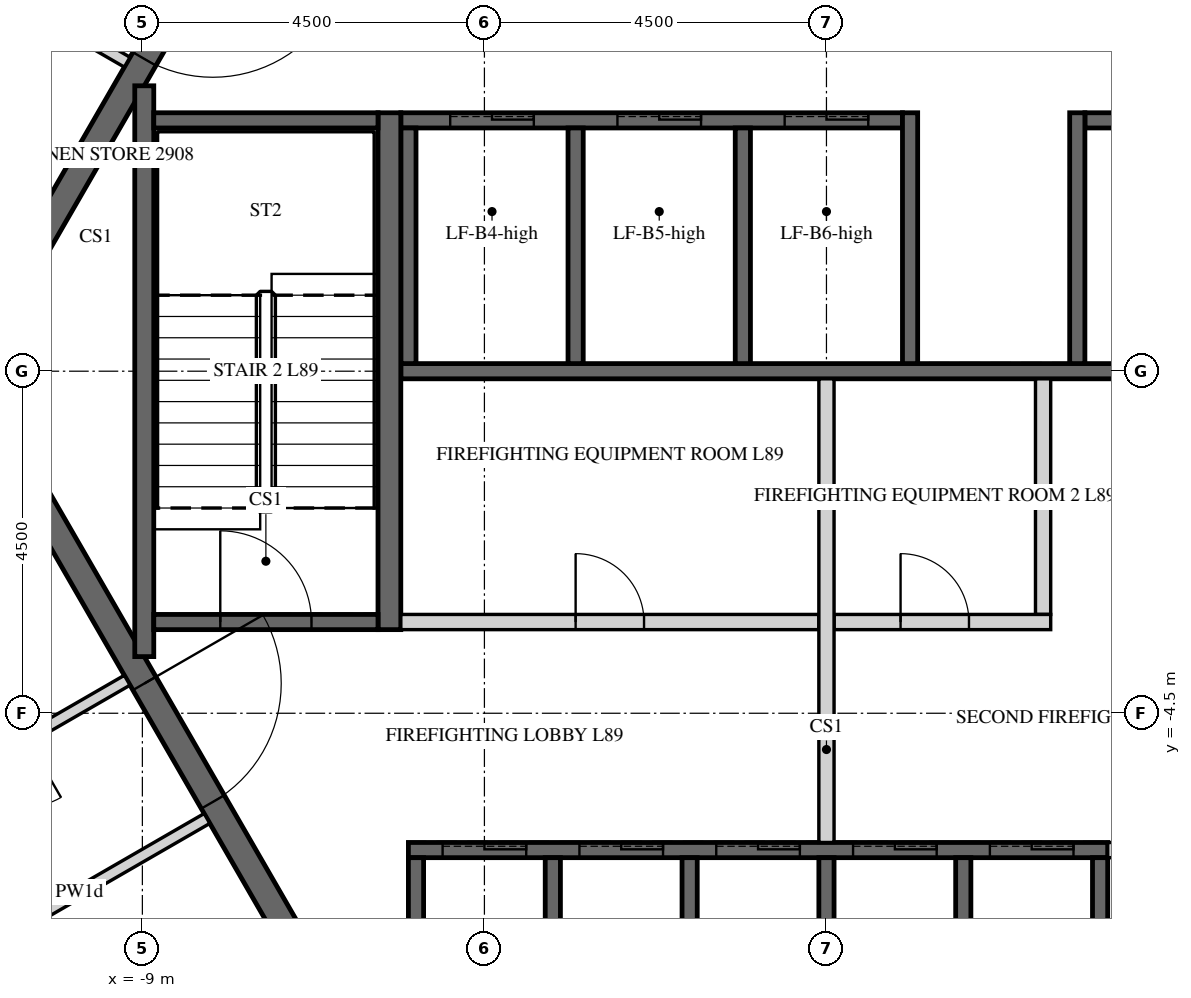
"""IFC4 building model, lengths in metres.
Left out: names, types, materials, properties, quantities, classifications, styles, units other than length and angle.
Written with IfcOpenShell. Run it as: python <this file> out.ifc"""

import sys

from ifc_helpers import new_model, si_unit, direction, frame, frame_2d, origin, place, context, subcontext, project, spatial, polyline, rectangle, outline, extrude, element, fill, save


model = new_model("IFC4")
c1 = context("Model", 3, precision=1e-05, world=origin(), true_north=direction((0.0, 1.0)))
c2 = subcontext(c1, "Body", "Model", "MODEL_VIEW")
j1 = project(units=[si_unit("LENGTHUNIT", "METRE"), si_unit("PLANEANGLEUNIT", "RADIAN")], contexts=[c1])
p1 = place(None, origin())
s1 = spatial("IfcSite", under=j1, at=p1, CompositionType="ELEMENT")
p2 = place(p1, origin())
s2 = spatial("IfcBuilding", under=s1, at=p2, CompositionType="ELEMENT")
p3 = place(p2, frame((0.0, 0.0, 369.0)))
s3 = spatial("IfcBuildingStorey", under=s2, at=p3, CompositionType="ELEMENT", Elevation=369.0)
p4 = place(p3, frame((-5.673, 9.825, -0.15), z_axis=(0.0, 0.0, 1.0), x_axis=(-0.499995046907, -0.866028263435, 0.0)))
e1 = element("IfcWall", 1, at=p4, inside=s3, PredefinedType="SHEAR", context=c2, shape_type="SweptSolid", body=[
    extrude(outline(polyline([(-0.101, -0.175), (11.446, -0.175), (11.244, 0.175), (0.101, 0.175), (-0.101, -0.175)])), origin(), (0.0, 0.0, 1.0), 3.9),
])
p5 = place(p4, frame((4.801, 0.0, 0.15)))
e2 = element("IfcOpeningElement", 2, at=p5, cuts=e1, PredefinedType="OPENING", context=c2, shape_type="SweptSolid", body=[
    extrude(rectangle(XDim=1.8, YDim=2.4, at=frame_2d((0.9, 1.2))), frame((0.0, 0.185, 0.0), z_axis=(0.0, -1.0, 0.0), x_axis=(1.0, 0.0, 0.0)), (0.0, 0.0, 1.0), 0.37),
])
p6 = place(p3, frame((-11.345, 0.0, -0.15), z_axis=(0.0, 0.0, 1.0), x_axis=(0.499995046907, -0.866028263435, 0.0)))
e3 = element("IfcWall", 3, at=p6, inside=s3, PredefinedType="SHEAR", context=c2, shape_type="SweptSolid", body=[
    extrude(outline(polyline([(-0.101, -0.175), (11.446, -0.175), (11.244, 0.175), (0.101, 0.175), (-0.101, -0.175)])), origin(), (0.0, 0.0, 1.0), 3.9),
])
p7 = place(p6, frame((4.744, 0.0, 0.15)))
e4 = element("IfcOpeningElement", 4, at=p7, cuts=e3, PredefinedType="OPENING", context=c2, shape_type="SweptSolid", body=[
    extrude(rectangle(XDim=1.8, YDim=2.4, at=frame_2d((0.9, 1.2))), frame((0.0, 0.185, 0.0), z_axis=(0.0, -1.0, 0.0), x_axis=(1.0, 0.0, 0.0)), (0.0, 0.0, 1.0), 0.37),
])
p8 = place(p3, frame((-5.6, 3.3, -0.25), z_axis=(0.0, 0.0, 1.0), x_axis=(1.0, 0.0, 0.0)))
e5 = element("IfcWall", 5, at=p8, inside=s3, PredefinedType="SHEAR", context=c2, shape_type="SweptSolid", body=[
    extrude(rectangle(XDim=6.6, YDim=0.2, at=frame_2d((3.3, 0.0))), origin(), (0.0, 0.0, 1.0), 3.9),
])
p9 = place(p8, frame((0.65, 0.0, 0.25)))
e6 = element("IfcOpeningElement", 6, at=p9, cuts=e5, PredefinedType="OPENING", context=c2, shape_type="SweptSolid", body=[
    extrude(rectangle(XDim=1.1, YDim=2.1, at=frame_2d((0.55, 1.05))), frame((0.0, 0.11, 0.0), z_axis=(0.0, -1.0, 0.0), x_axis=(1.0, 0.0, 0.0)), (0.0, 0.0, 1.0), 0.22),
])
p10 = place(p8, frame((2.85, 0.0, 0.25)))
e7 = element("IfcOpeningElement", 7, at=p10, cuts=e5, PredefinedType="OPENING", context=c2, shape_type="SweptSolid", body=[
    extrude(rectangle(XDim=1.1, YDim=2.1, at=frame_2d((0.55, 1.05))), frame((0.0, 0.11, 0.0), z_axis=(0.0, -1.0, 0.0), x_axis=(1.0, 0.0, 0.0)), (0.0, 0.0, 1.0), 0.22),
])
p11 = place(p8, frame((5.05, 0.0, 0.25)))
e8 = element("IfcOpeningElement", 8, at=p11, cuts=e5, PredefinedType="OPENING", context=c2, shape_type="SweptSolid", body=[
    extrude(rectangle(XDim=1.1, YDim=2.1, at=frame_2d((0.55, 1.05))), frame((0.0, 0.11, 0.0), z_axis=(0.0, -1.0, 0.0), x_axis=(1.0, 0.0, 0.0)), (0.0, 0.0, 1.0), 0.22),
])
p12 = place(p3, frame((3.4, 3.3, -0.25), z_axis=(0.0, 0.0, 1.0), x_axis=(1.0, 0.0, 0.0)))
e9 = element("IfcWall", 9, at=p12, inside=s3, PredefinedType="SHEAR", context=c2, shape_type="SweptSolid", body=[
    extrude(rectangle(XDim=2.2, YDim=0.2, at=frame_2d((1.1, 0.0))), origin(), (0.0, 0.0, 1.0), 3.9),
])
p13 = place(p12, frame((0.45, 0.0, 0.25)))
e10 = element("IfcOpeningElement", 10, at=p13, cuts=e9, PredefinedType="OPENING", context=c2, shape_type="SweptSolid", body=[
    extrude(rectangle(XDim=1.1, YDim=2.1, at=frame_2d((0.55, 1.05))), frame((0.0, 0.11, 0.0), z_axis=(0.0, -1.0, 0.0), x_axis=(1.0, 0.0, 0.0)), (0.0, 0.0, 1.0), 0.22),
])
p14 = place(p3, frame((-5.6, 0.0, -0.25), z_axis=(0.0, 0.0, 1.0), x_axis=(1.0, 0.0, 0.0)))
e11 = element("IfcWall", 11, at=p14, inside=s3, PredefinedType="SHEAR", context=c2, shape_type="SweptSolid", body=[
    extrude(rectangle(XDim=11.2, YDim=0.2, at=frame_2d((5.6, 0.0))), origin(), (0.0, 0.0, 1.0), 3.9),
])
for number, where, z_axis, x_axis in (
    (12, (-5.5, 0.1, -0.25), (0.0, 0.0, 1.0), (0.0, 1.0, 0.0)),
    (13, (-3.3, 0.1, -0.25), (0.0, 0.0, 1.0), (0.0, 1.0, 0.0)),
    (14, (-1.1, 0.1, -0.25), (0.0, 0.0, 1.0), (0.0, 1.0, 0.0)),
):
    element("IfcWall", number, at=place(p3, frame(where, z_axis=z_axis, x_axis=x_axis)), inside=s3, PredefinedType="SHEAR", context=c2, shape_type="SweptSolid", body=[
        extrude(rectangle(XDim=3.1, YDim=0.2, at=frame_2d((1.55, 0.0))), origin(), (0.0, 0.0, 1.0), 3.9),
    ])
for number, where, z_axis, x_axis in (
    (15, (1.1, 0.1, -0.25), (0.0, 0.0, 1.0), (0.0, 1.0, 0.0)),
    (16, (3.3, 0.1, -0.25), (0.0, 0.0, 1.0), (0.0, 1.0, 0.0)),
):
    element("IfcWall", number, at=place(p3, frame(where, z_axis=z_axis, x_axis=x_axis)), inside=s3, PredefinedType="SHEAR", context=c2, shape_type="SweptSolid", body=[
        extrude(rectangle(XDim=3.3, YDim=0.2, at=frame_2d((1.65, 0.0))), origin(), (0.0, 0.0, 1.0), 3.9),
    ])
p15 = place(p3, frame((-5.5, -6.3, -0.25), z_axis=(0.0, 0.0, 1.0), x_axis=(1.0, 0.0, 0.0)))
e17 = element("IfcWall", 17, at=p15, inside=s3, PredefinedType="SHEAR", context=c2, shape_type="SweptSolid", body=[
    extrude(rectangle(XDim=9.2, YDim=0.2, at=frame_2d((4.6, 0.0))), origin(), (0.0, 0.0, 1.0), 3.9),
])
p16 = place(p15, frame((0.45, 0.0, 0.25)))
e18 = element("IfcOpeningElement", 18, at=p16, cuts=e17, PredefinedType="OPENING", context=c2, shape_type="SweptSolid", body=[
    extrude(rectangle(XDim=1.1, YDim=2.1, at=frame_2d((0.55, 1.05))), frame((0.0, 0.11, 0.0), z_axis=(0.0, -1.0, 0.0), x_axis=(1.0, 0.0, 0.0)), (0.0, 0.0, 1.0), 0.22),
])
p17 = place(p15, frame((2.25, 0.0, 0.25)))
e19 = element("IfcOpeningElement", 19, at=p17, cuts=e17, PredefinedType="OPENING", context=c2, shape_type="SweptSolid", body=[
    extrude(rectangle(XDim=1.1, YDim=2.1, at=frame_2d((0.55, 1.05))), frame((0.0, 0.11, 0.0), z_axis=(0.0, -1.0, 0.0), x_axis=(1.0, 0.0, 0.0)), (0.0, 0.0, 1.0), 0.22),
])
p18 = place(p15, frame((4.05, 0.0, 0.25)))
e20 = element("IfcOpeningElement", 20, at=p18, cuts=e17, PredefinedType="OPENING", context=c2, shape_type="SweptSolid", body=[
    extrude(rectangle(XDim=1.1, YDim=2.1, at=frame_2d((0.55, 1.05))), frame((0.0, 0.11, 0.0), z_axis=(0.0, -1.0, 0.0), x_axis=(1.0, 0.0, 0.0)), (0.0, 0.0, 1.0), 0.22),
])
p19 = place(p15, frame((5.85, 0.0, 0.25)))
e21 = element("IfcOpeningElement", 21, at=p19, cuts=e17, PredefinedType="OPENING", context=c2, shape_type="SweptSolid", body=[
    extrude(rectangle(XDim=1.1, YDim=2.1, at=frame_2d((0.55, 1.05))), frame((0.0, 0.11, 0.0), z_axis=(0.0, -1.0, 0.0), x_axis=(1.0, 0.0, 0.0)), (0.0, 0.0, 1.0), 0.22),
])
p20 = place(p15, frame((7.65, 0.0, 0.25)))
e22 = element("IfcOpeningElement", 22, at=p20, cuts=e17, PredefinedType="OPENING", context=c2, shape_type="SweptSolid", body=[
    extrude(rectangle(XDim=1.1, YDim=2.1, at=frame_2d((0.55, 1.05))), frame((0.0, 0.11, 0.0), z_axis=(0.0, -1.0, 0.0), x_axis=(1.0, 0.0, 0.0)), (0.0, 0.0, 1.0), 0.22),
])
for number, where, z_axis, x_axis in (
    (23, (-5.4, -9.3, -0.25), (0.0, 0.0, 1.0), (0.0, 1.0, 0.0)),
    (24, (-3.6, -9.3, -0.25), (0.0, 0.0, 1.0), (0.0, 1.0, 0.0)),
    (25, (-1.8, -9.3, -0.25), (0.0, 0.0, 1.0), (0.0, 1.0, 0.0)),
    (26, (0.0, -9.3, -0.25), (0.0, 0.0, 1.0), (0.0, 1.0, 0.0)),
    (27, (1.8, -9.3, -0.25), (0.0, 0.0, 1.0), (0.0, 1.0, 0.0)),
    (28, (3.6, -9.3, -0.25), (0.0, 0.0, 1.0), (0.0, 1.0, 0.0)),
):
    element("IfcWall", number, at=place(p3, frame(where, z_axis=z_axis, x_axis=x_axis)), inside=s3, PredefinedType="SHEAR", context=c2, shape_type="SweptSolid", body=[
        extrude(rectangle(XDim=2.9, YDim=0.2, at=frame_2d((1.45, 0.0))), origin(), (0.0, 0.0, 1.0), 3.9),
    ])
p21 = place(p3, frame((-5.6, -3.3, 0.0), z_axis=(0.0, 0.0, 1.0), x_axis=(1.0, 0.0, 0.0)))
e29 = element("IfcWall", 29, at=p21, inside=s3, PredefinedType="PARTITIONING", context=c2, shape_type="SweptSolid", body=[
    extrude(rectangle(XDim=5.5, YDim=0.2, at=frame_2d((2.75, 0.0))), origin(), (0.0, 0.0, 1.0), 3.65),
])
p22 = place(p21, frame((2.3, 0.0, 0.0)))
e30 = element("IfcOpeningElement", 30, at=p22, cuts=e29, PredefinedType="OPENING", context=c2, shape_type="SweptSolid", body=[
    extrude(rectangle(XDim=0.9, YDim=2.1, at=frame_2d((0.45, 1.05))), frame((0.0, 0.11, 0.0), z_axis=(0.0, -1.0, 0.0), x_axis=(1.0, 0.0, 0.0)), (0.0, 0.0, 1.0), 0.22),
])
p23 = place(p3, frame((0.1, -3.3, 0.0), z_axis=(0.0, 0.0, 1.0), x_axis=(1.0, 0.0, 0.0)))
e31 = element("IfcWall", 31, at=p23, inside=s3, PredefinedType="PARTITIONING", context=c2, shape_type="SweptSolid", body=[
    extrude(rectangle(XDim=2.85, YDim=0.2, at=frame_2d((1.425, 0.0))), origin(), (0.0, 0.0, 1.0), 3.65),
])
p24 = place(p23, frame((0.875, 0.0, 0.0)))
e32 = element("IfcOpeningElement", 32, at=p24, cuts=e31, PredefinedType="OPENING", context=c2, shape_type="SweptSolid", body=[
    extrude(rectangle(XDim=0.9, YDim=2.1, at=frame_2d((0.45, 1.05))), frame((0.0, 0.11, 0.0), z_axis=(0.0, -1.0, 0.0), x_axis=(1.0, 0.0, 0.0)), (0.0, 0.0, 1.0), 0.22),
])
p25 = place(p3, frame((2.85, -3.2, 0.0), z_axis=(0.0, 0.0, 1.0), x_axis=(0.0, 1.0, 0.0)))
e33 = element("IfcWall", 33, at=p25, inside=s3, PredefinedType="PARTITIONING", context=c2, shape_type="SweptSolid", body=[
    extrude(rectangle(XDim=3.1, YDim=0.2, at=frame_2d((1.55, 0.0))), origin(), (0.0, 0.0, 1.0), 3.65),
])
p26 = place(p3, frame((0.0, -6.2, 0.0), z_axis=(0.0, 0.0, 1.0), x_axis=(0.0, 1.0, 0.0)))
e34 = element("IfcWall", 34, at=p26, inside=s3, PredefinedType="PARTITIONING", context=c2, shape_type="SweptSolid", body=[
    extrude(rectangle(XDim=6.1, YDim=0.2, at=frame_2d((3.05, 0.0))), origin(), (0.0, 0.0, 1.0), 3.65),
])
p27 = place(p3, frame((3.7, -6.3, 0.0), z_axis=(0.0, 0.0, 1.0), x_axis=(1.0, 0.0, 0.0)))
e35 = element("IfcWall", 35, at=p27, inside=s3, PredefinedType="PARTITIONING", context=c2, shape_type="SweptSolid", body=[
    extrude(rectangle(XDim=3.806, YDim=0.2, at=frame_2d((1.903, 0.0))), origin(), (0.0, 0.0, 1.0), 3.65),
])
p28 = place(p27, frame((1.453, 0.0, 0.0)))
e36 = element("IfcOpeningElement", 36, at=p28, cuts=e35, PredefinedType="OPENING", context=c2, shape_type="SweptSolid", body=[
    extrude(rectangle(XDim=0.9, YDim=2.1, at=frame_2d((0.45, 1.05))), frame((0.0, 0.11, 0.0), z_axis=(0.0, -1.0, 0.0), x_axis=(1.0, 0.0, 0.0)), (0.0, 0.0, 1.0), 0.22),
])
p29 = place(p3, frame((-5.75, -3.4, -0.25), z_axis=(0.0, 0.0, 1.0), x_axis=(0.0, 1.0, 0.0)))
e37 = element("IfcWall", 37, at=p29, inside=s3, PredefinedType="SHEAR", context=c2, shape_type="SweptSolid", body=[
    extrude(rectangle(XDim=6.8, YDim=0.3, at=frame_2d((3.4, 0.0))), origin(), (0.0, 0.0, 1.0), 3.9),
])
p30 = place(p3, frame((-8.975, -3.755, -0.25), z_axis=(0.0, 0.0, 1.0), x_axis=(0.0, 1.0, 0.0)))
e38 = element("IfcWall", 38, at=p30, inside=s3, PredefinedType="SHEAR", context=c2, shape_type="SweptSolid", body=[
    extrude(rectangle(XDim=7.51, YDim=0.25, at=frame_2d((3.755, 0.0))), origin(), (0.0, 0.0, 1.0), 3.9),
])
p31 = place(p3, frame((-8.85, 3.3, -0.25), z_axis=(0.0, 0.0, 1.0), x_axis=(1.0, 0.0, 0.0)))
e39 = element("IfcWall", 39, at=p31, inside=s3, PredefinedType="SHEAR", context=c2, shape_type="SweptSolid", body=[
    extrude(rectangle(XDim=2.95, YDim=0.2, at=frame_2d((1.475, 0.0))), origin(), (0.0, 0.0, 1.0), 3.9),
])
p32 = place(p3, frame((-8.85, -3.3, -0.25), z_axis=(0.0, 0.0, 1.0), x_axis=(1.0, 0.0, 0.0)))
e40 = element("IfcWall", 40, at=p32, inside=s3, PredefinedType="SHEAR", context=c2, shape_type="SweptSolid", body=[
    extrude(rectangle(XDim=2.95, YDim=0.2, at=frame_2d((1.475, 0.0))), origin(), (0.0, 0.0, 1.0), 3.9),
])
p33 = place(p32, frame((0.875, 0.0, 0.25)))
e41 = element("IfcOpeningElement", 41, at=p33, cuts=e40, PredefinedType="OPENING", context=c2, shape_type="SweptSolid", body=[
    extrude(rectangle(XDim=1.2, YDim=2.4, at=frame_2d((0.6, 1.2))), frame((0.0, 0.11, 0.0), z_axis=(0.0, -1.0, 0.0), x_axis=(1.0, 0.0, 0.0)), (0.0, 0.0, 1.0), 0.22),
])
p34 = place(p3, frame((-7.653, 15.675, 0.0), z_axis=(0.0, 0.0, 1.0), x_axis=(-0.438369669055, -0.898794767037, 0.0)))
e42 = element("IfcWall", 42, at=p34, inside=s3, PredefinedType="PARTITIONING", context=c2, shape_type="SweptSolid", body=[
    extrude(rectangle(XDim=15.243, YDim=0.15, at=frame_2d((7.621, 0.0))), origin(), (0.0, 0.0, 1.0), 2.47),
])
p35 = place(p34, frame((2.942, 0.0, 0.0)))
e43 = element("IfcOpeningElement", 43, at=p35, cuts=e42, PredefinedType="OPENING", context=c2, shape_type="SweptSolid", body=[
    extrude(rectangle(XDim=1.0, YDim=2.1, at=frame_2d((0.5, 1.05))), frame((0.0, 0.085, 0.0), z_axis=(0.0, -1.0, 0.0), x_axis=(1.0, 0.0, 0.0)), (0.0, 0.0, 1.0), 0.17),
])
p36 = place(p3, frame((-10.783, 4.98, 0.0), z_axis=(0.0, 0.0, 1.0), x_axis=(0.866007702746, -0.500030657845, 0.0)))
e44 = element("IfcWall", 44, at=p36, inside=s3, PredefinedType="PARTITIONING", context=c2, shape_type="SweptSolid", body=[
    extrude(rectangle(XDim=1.829, YDim=0.15, at=frame_2d((0.914, 0.0))), origin(), (0.0, 0.0, 1.0), 2.47),
])
p37 = place(p3, frame((-16.583, -2.777, 0.0), z_axis=(0.0, 0.0, 1.0), x_axis=(0.50000467473, -0.866022704811, 0.0)))
e45 = element("IfcWall", 45, at=p37, inside=s3, PredefinedType="PARTITIONING", context=c2, shape_type="SweptSolid", body=[
    extrude(rectangle(XDim=13.504, YDim=0.15, at=frame_2d((6.752, 0.0))), origin(), (0.0, 0.0, 1.0), 2.47),
])
p38 = place(p37, frame((0.925, 0.0, 0.0)))
e46 = element("IfcOpeningElement", 46, at=p38, cuts=e45, PredefinedType="OPENING", context=c2, shape_type="SweptSolid", body=[
    extrude(rectangle(XDim=1.0, YDim=2.1, at=frame_2d((0.5, 1.05))), frame((0.0, 0.085, 0.0), z_axis=(0.0, -1.0, 0.0), x_axis=(1.0, 0.0, 0.0)), (0.0, 0.0, 1.0), 0.17),
])
p39 = place(p3, frame((-9.2, -4.066, 0.0), z_axis=(0.0, 0.0, 1.0), x_axis=(-0.866020906874, -0.500007788796, 0.0)))
e47 = element("IfcWall", 47, at=p39, inside=s3, PredefinedType="PARTITIONING", context=c2, shape_type="SweptSolid", body=[
    extrude(rectangle(XDim=3.95, YDim=0.15, at=frame_2d((1.975, 0.0))), origin(), (0.0, 0.0, 1.0), 2.47),
])
p40 = place(p39, frame((1.525, 0.0, 0.0)))
e48 = element("IfcOpeningElement", 48, at=p40, cuts=e47, PredefinedType="OPENING", context=c2, shape_type="SweptSolid", body=[
    extrude(rectangle(XDim=0.9, YDim=2.1, at=frame_2d((0.45, 1.05))), frame((0.0, 0.085, 0.0), z_axis=(0.0, -1.0, 0.0), x_axis=(1.0, 0.0, 0.0)), (0.0, 0.0, 1.0), 0.17),
])
p41 = place(p3, frame((-11.506, -7.822, 0.0), z_axis=(0.0, 0.0, 1.0), x_axis=(0.866032409438, 0.499987865656, 0.0)))
e49 = element("IfcWall", 49, at=p41, inside=s3, PredefinedType="PARTITIONING", context=c2, shape_type="SweptSolid", body=[
    extrude(rectangle(XDim=3.875, YDim=0.15, at=frame_2d((1.938, 0.0))), origin(), (0.0, 0.0, 1.0), 2.47),
])
p42 = place(p5, origin())
e50 = element("IfcDoor", 50, at=p42, inside=s3, OperationType="DOUBLE_DOOR_SINGLE_SWING", PredefinedType="DOOR", context=c2, shape_type="SweptSolid", body=[
    extrude(rectangle(XDim=1.8, YDim=2.4, at=frame_2d((0.9, 1.2))), frame((0.0, 0.025, 0.0), z_axis=(0.0, -1.0, 0.0), x_axis=(1.0, 0.0, 0.0)), (0.0, 0.0, 1.0), 0.05),
])
fill(e2, e50)
p43 = place(p7, origin())
e51 = element("IfcDoor", 51, at=p43, inside=s3, OperationType="DOUBLE_DOOR_SINGLE_SWING", PredefinedType="DOOR", context=c2, shape_type="SweptSolid", body=[
    extrude(rectangle(XDim=1.8, YDim=2.4, at=frame_2d((0.9, 1.2))), frame((0.0, 0.025, 0.0), z_axis=(0.0, -1.0, 0.0), x_axis=(1.0, 0.0, 0.0)), (0.0, 0.0, 1.0), 0.05),
])
fill(e4, e51)
p44 = place(p22, origin())
e52 = element("IfcDoor", 52, at=p44, inside=s3, OperationType="SINGLE_SWING_LEFT", PredefinedType="DOOR", context=c2, shape_type="SweptSolid", body=[
    extrude(rectangle(XDim=0.9, YDim=2.1, at=frame_2d((0.45, 1.05))), frame((0.0, 0.025, 0.0), z_axis=(0.0, -1.0, 0.0), x_axis=(1.0, 0.0, 0.0)), (0.0, 0.0, 1.0), 0.05),
])
fill(e30, e52)
p45 = place(p24, origin())
e53 = element("IfcDoor", 53, at=p45, inside=s3, OperationType="SINGLE_SWING_LEFT", PredefinedType="DOOR", context=c2, shape_type="SweptSolid", body=[
    extrude(rectangle(XDim=0.9, YDim=2.1, at=frame_2d((0.45, 1.05))), frame((0.0, 0.025, 0.0), z_axis=(0.0, -1.0, 0.0), x_axis=(1.0, 0.0, 0.0)), (0.0, 0.0, 1.0), 0.05),
])
fill(e32, e53)
p46 = place(p33, origin())
e54 = element("IfcDoor", 54, at=p46, inside=s3, OperationType="SINGLE_SWING_LEFT", PredefinedType="DOOR", context=c2, shape_type="SweptSolid", body=[
    extrude(rectangle(XDim=1.2, YDim=2.4, at=frame_2d((0.6, 1.2))), frame((0.0, 0.025, 0.0), z_axis=(0.0, -1.0, 0.0), x_axis=(1.0, 0.0, 0.0)), (0.0, 0.0, 1.0), 0.05),
])
fill(e41, e54)
p47 = place(p9, origin())
e55 = element("IfcDoor", 55, at=p47, inside=s3, OperationType="SLIDING_TO_LEFT", PredefinedType="DOOR", context=c2, shape_type="SweptSolid", body=[
    extrude(rectangle(XDim=1.1, YDim=2.1, at=frame_2d((0.55, 1.05))), frame((0.0, 0.025, 0.0), z_axis=(0.0, -1.0, 0.0), x_axis=(1.0, 0.0, 0.0)), (0.0, 0.0, 1.0), 0.05),
])
fill(e6, e55)
p48 = place(p10, origin())
e56 = element("IfcDoor", 56, at=p48, inside=s3, OperationType="SLIDING_TO_LEFT", PredefinedType="DOOR", context=c2, shape_type="SweptSolid", body=[
    extrude(rectangle(XDim=1.1, YDim=2.1, at=frame_2d((0.55, 1.05))), frame((0.0, 0.025, 0.0), z_axis=(0.0, -1.0, 0.0), x_axis=(1.0, 0.0, 0.0)), (0.0, 0.0, 1.0), 0.05),
])
fill(e7, e56)
p49 = place(p11, origin())
e57 = element("IfcDoor", 57, at=p49, inside=s3, OperationType="SLIDING_TO_LEFT", PredefinedType="DOOR", context=c2, shape_type="SweptSolid", body=[
    extrude(rectangle(XDim=1.1, YDim=2.1, at=frame_2d((0.55, 1.05))), frame((0.0, 0.025, 0.0), z_axis=(0.0, -1.0, 0.0), x_axis=(1.0, 0.0, 0.0)), (0.0, 0.0, 1.0), 0.05),
])
fill(e8, e57)
p50 = place(p16, origin())
e58 = element("IfcDoor", 58, at=p50, inside=s3, OperationType="SLIDING_TO_LEFT", PredefinedType="DOOR", context=c2, shape_type="SweptSolid", body=[
    extrude(rectangle(XDim=1.1, YDim=2.1, at=frame_2d((0.55, 1.05))), frame((0.0, 0.025, 0.0), z_axis=(0.0, -1.0, 0.0), x_axis=(1.0, 0.0, 0.0)), (0.0, 0.0, 1.0), 0.05),
])
fill(e18, e58)
p51 = place(p17, origin())
e59 = element("IfcDoor", 59, at=p51, inside=s3, OperationType="SLIDING_TO_LEFT", PredefinedType="DOOR", context=c2, shape_type="SweptSolid", body=[
    extrude(rectangle(XDim=1.1, YDim=2.1, at=frame_2d((0.55, 1.05))), frame((0.0, 0.025, 0.0), z_axis=(0.0, -1.0, 0.0), x_axis=(1.0, 0.0, 0.0)), (0.0, 0.0, 1.0), 0.05),
])
fill(e19, e59)
p52 = place(p18, origin())
e60 = element("IfcDoor", 60, at=p52, inside=s3, OperationType="SLIDING_TO_LEFT", PredefinedType="DOOR", context=c2, shape_type="SweptSolid", body=[
    extrude(rectangle(XDim=1.1, YDim=2.1, at=frame_2d((0.55, 1.05))), frame((0.0, 0.025, 0.0), z_axis=(0.0, -1.0, 0.0), x_axis=(1.0, 0.0, 0.0)), (0.0, 0.0, 1.0), 0.05),
])
fill(e20, e60)
p53 = place(p19, origin())
e61 = element("IfcDoor", 61, at=p53, inside=s3, OperationType="SLIDING_TO_LEFT", PredefinedType="DOOR", context=c2, shape_type="SweptSolid", body=[
    extrude(rectangle(XDim=1.1, YDim=2.1, at=frame_2d((0.55, 1.05))), frame((0.0, 0.025, 0.0), z_axis=(0.0, -1.0, 0.0), x_axis=(1.0, 0.0, 0.0)), (0.0, 0.0, 1.0), 0.05),
])
fill(e21, e61)
p54 = place(p20, origin())
e62 = element("IfcDoor", 62, at=p54, inside=s3, OperationType="SLIDING_TO_LEFT", PredefinedType="DOOR", context=c2, shape_type="SweptSolid", body=[
    extrude(rectangle(XDim=1.1, YDim=2.1, at=frame_2d((0.55, 1.05))), frame((0.0, 0.025, 0.0), z_axis=(0.0, -1.0, 0.0), x_axis=(1.0, 0.0, 0.0)), (0.0, 0.0, 1.0), 0.05),
])
fill(e22, e62)
save(model, sys.argv[1])
